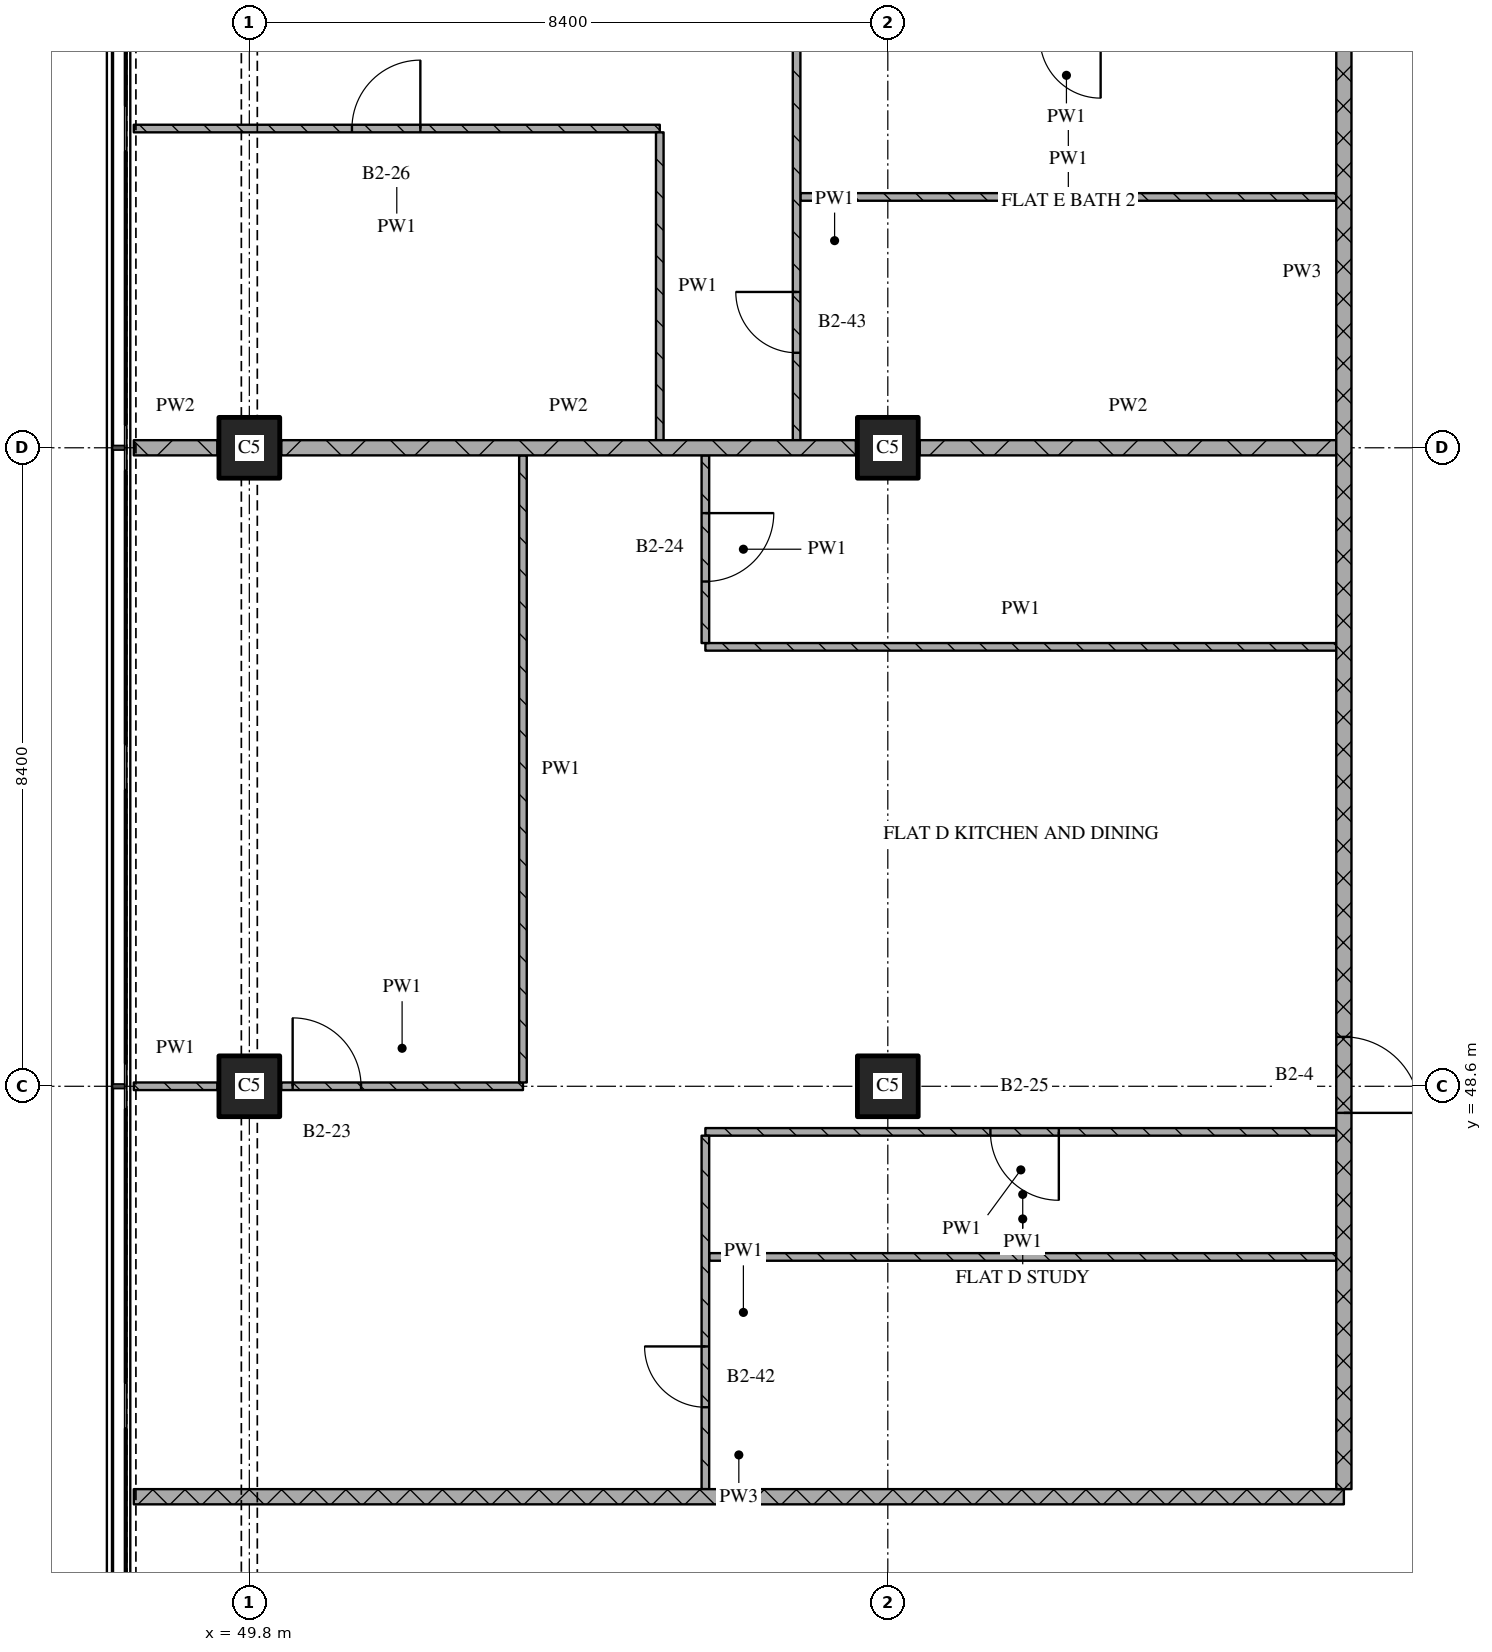
"""IFC4 building model, lengths in metres.
Left out: names, types, materials, properties, quantities, classifications, styles, units other than length and angle.
Written with IfcOpenShell. Run it as: python <this file> out.ifc"""

import sys

from ifc_helpers import new_model, si_unit, direction, frame, frame_2d, origin, origin_2d, place, context, subcontext, project, spatial, rectangle, extrude, element, fill, save


model = new_model("IFC4")
c1 = context("Model", 3, precision=1e-05, world=origin(), true_north=direction((0.0, 1.0)))
c2 = subcontext(c1, "Body", "Model", "MODEL_VIEW")
j1 = project(units=[si_unit("LENGTHUNIT", "METRE"), si_unit("PLANEANGLEUNIT", "RADIAN")], contexts=[c1])
p1 = place(None, origin())
s1 = spatial("IfcSite", under=j1, at=p1, CompositionType="ELEMENT")
p2 = place(p1, origin())
s2 = spatial("IfcBuilding", under=s1, at=p2, CompositionType="ELEMENT")
p3 = place(p2, frame((0.0, 0.0, 113.25)))
s3 = spatial("IfcBuildingStorey", under=s2, at=p3, CompositionType="ELEMENT", Elevation=113.25)
for number, where, z_axis, x_axis in (
    (1, (49.8, 48.6, 0.0), (0.0, 0.0, 1.0), (1.0, 0.0, 0.0)),
    (2, (49.8, 57.0, 0.0), (0.0, 0.0, 1.0), (1.0, 0.0, 0.0)),
    (3, (58.2, 48.6, 0.0), (0.0, 0.0, 1.0), (1.0, 0.0, 0.0)),
    (4, (58.2, 57.0, 0.0), (0.0, 0.0, 1.0), (1.0, 0.0, 0.0)),
):
    element("IfcColumn", number, at=place(p3, frame(where, z_axis=z_axis, x_axis=x_axis)), inside=s3, PredefinedType="COLUMN", context=c2, shape_type="SweptSolid", body=[
        extrude(rectangle(XDim=0.8, YDim=0.8, at=origin_2d()), origin(), (0.0, 0.0, 1.0), 3.6),
    ])
p4 = place(p3, frame((48.28, 43.2, 0.0), z_axis=(0.0, 0.0, 1.0), x_axis=(1.0, 0.0, 0.0)))
e5 = element("IfcWall", 5, at=p4, inside=s3, PredefinedType="PARTITIONING", context=c2, shape_type="SweptSolid", body=[
    extrude(rectangle(XDim=15.92, YDim=0.2, at=frame_2d((7.96, 0.0))), origin(), (0.0, 0.0, 1.0), 3.32),
])
p5 = place(p3, frame((55.85, 46.355, 0.0), z_axis=(0.0, 0.0, 1.0), x_axis=(1.0, 0.0, 0.0)))
e6 = element("IfcWall", 6, at=p5, inside=s3, PredefinedType="PARTITIONING", context=c2, shape_type="SweptSolid", body=[
    extrude(rectangle(XDim=8.25, YDim=0.1, at=frame_2d((4.125, 0.0))), origin(), (0.0, 0.0, 1.0), 3.32),
])
p6 = place(p3, frame((64.1, 48.0, 0.0), z_axis=(0.0, 0.0, 1.0), x_axis=(-1.0, 0.0, 0.0)))
e7 = element("IfcWall", 7, at=p6, inside=s3, PredefinedType="PARTITIONING", context=c2, shape_type="SweptSolid", body=[
    extrude(rectangle(XDim=8.3, YDim=0.1, at=frame_2d((4.15, 0.0))), origin(), (0.0, 0.0, 1.0), 3.32),
])
p7 = place(p6, frame((3.65, 0.0, 0.0)))
e8 = element("IfcOpeningElement", 8, at=p7, cuts=e7, PredefinedType="OPENING", context=c2, shape_type="SweptSolid", body=[
    extrude(rectangle(XDim=0.9, YDim=2.1, at=frame_2d((0.45, 1.05))), frame((0.0, 0.06, 0.0), z_axis=(0.0, -1.0, 0.0), x_axis=(1.0, 0.0, 0.0)), (0.0, 0.0, 1.0), 0.12),
])
p8 = place(p3, frame((48.28, 48.6, 0.0), z_axis=(0.0, 0.0, 1.0), x_axis=(1.0, 0.0, 0.0)))
e9 = element("IfcWall", 9, at=p8, inside=s3, PredefinedType="PARTITIONING", context=c2, shape_type="SweptSolid", body=[
    extrude(rectangle(XDim=1.1, YDim=0.1, at=frame_2d((0.55, 0.0))), origin(), (0.0, 0.0, 1.0), 3.32),
])
p9 = place(p3, frame((50.22, 48.6, 0.0), z_axis=(0.0, 0.0, 1.0), x_axis=(1.0, 0.0, 0.0)))
e10 = element("IfcWall", 10, at=p9, inside=s3, PredefinedType="PARTITIONING", context=c2, shape_type="SweptSolid", body=[
    extrude(rectangle(XDim=3.18, YDim=0.1, at=frame_2d((1.59, 0.0))), origin(), (0.0, 0.0, 1.0), 3.32),
])
p10 = place(p9, frame((0.15, 0.0, 0.0)))
e11 = element("IfcOpeningElement", 11, at=p10, cuts=e10, PredefinedType="OPENING", context=c2, shape_type="SweptSolid", body=[
    extrude(rectangle(XDim=0.9, YDim=2.1, at=frame_2d((0.45, 1.05))), frame((0.0, 0.06, 0.0), z_axis=(0.0, -1.0, 0.0), x_axis=(1.0, 0.0, 0.0)), (0.0, 0.0, 1.0), 0.12),
])
p11 = place(p3, frame((55.8, 54.381, 0.0), z_axis=(0.0, 0.0, 1.0), x_axis=(1.0, 0.0, 0.0)))
e12 = element("IfcWall", 12, at=p11, inside=s3, PredefinedType="PARTITIONING", context=c2, shape_type="SweptSolid", body=[
    extrude(rectangle(XDim=8.3, YDim=0.1, at=frame_2d((4.15, 0.0))), origin(), (0.0, 0.0, 1.0), 3.32),
])
p12 = place(p3, frame((48.28, 57.0, 0.0), z_axis=(0.0, 0.0, 1.0), x_axis=(1.0, 0.0, 0.0)))
e13 = element("IfcWall", 13, at=p12, inside=s3, PredefinedType="PARTITIONING", context=c2, shape_type="SweptSolid", body=[
    extrude(rectangle(XDim=1.1, YDim=0.2, at=frame_2d((0.55, 0.0))), origin(), (0.0, 0.0, 1.0), 3.32),
])
p13 = place(p3, frame((50.22, 57.0, 0.0), z_axis=(0.0, 0.0, 1.0), x_axis=(1.0, 0.0, 0.0)))
e14 = element("IfcWall", 14, at=p13, inside=s3, PredefinedType="PARTITIONING", context=c2, shape_type="SweptSolid", body=[
    extrude(rectangle(XDim=7.56, YDim=0.2, at=frame_2d((3.78, 0.0))), origin(), (0.0, 0.0, 1.0), 3.32),
])
p14 = place(p3, frame((58.62, 57.0, 0.0), z_axis=(0.0, 0.0, 1.0), x_axis=(1.0, 0.0, 0.0)))
e15 = element("IfcWall", 15, at=p14, inside=s3, PredefinedType="PARTITIONING", context=c2, shape_type="SweptSolid", body=[
    extrude(rectangle(XDim=5.48, YDim=0.2, at=frame_2d((2.74, 0.0))), origin(), (0.0, 0.0, 1.0), 3.32),
])
p15 = place(p3, frame((57.05, 60.3, 0.0), z_axis=(0.0, 0.0, 1.0), x_axis=(1.0, 0.0, 0.0)))
e16 = element("IfcWall", 16, at=p15, inside=s3, PredefinedType="PARTITIONING", context=c2, shape_type="SweptSolid", body=[
    extrude(rectangle(XDim=7.05, YDim=0.1, at=frame_2d((3.525, 0.0))), origin(), (0.0, 0.0, 1.0), 3.32),
])
p16 = place(p3, frame((55.2, 61.2, 0.0), z_axis=(0.0, 0.0, 1.0), x_axis=(-1.0, 0.0, 0.0)))
e17 = element("IfcWall", 17, at=p16, inside=s3, PredefinedType="PARTITIONING", context=c2, shape_type="SweptSolid", body=[
    extrude(rectangle(XDim=6.92, YDim=0.1, at=frame_2d((3.46, 0.0))), origin(), (0.0, 0.0, 1.0), 3.32),
])
p17 = place(p16, frame((3.15, 0.0, 0.0)))
e18 = element("IfcOpeningElement", 18, at=p17, cuts=e17, PredefinedType="OPENING", context=c2, shape_type="SweptSolid", body=[
    extrude(rectangle(XDim=0.9, YDim=2.1, at=frame_2d((0.45, 1.05))), frame((0.0, 0.06, 0.0), z_axis=(0.0, -1.0, 0.0), x_axis=(1.0, 0.0, 0.0)), (0.0, 0.0, 1.0), 0.12),
])
p18 = place(p3, frame((53.4, 56.9, 0.0), z_axis=(0.0, 0.0, 1.0), x_axis=(0.0, -1.0, 0.0)))
e19 = element("IfcWall", 19, at=p18, inside=s3, PredefinedType="PARTITIONING", context=c2, shape_type="SweptSolid", body=[
    extrude(rectangle(XDim=8.25, YDim=0.1, at=frame_2d((4.125, 0.0))), origin(), (0.0, 0.0, 1.0), 3.32),
])
p19 = place(p3, frame((55.2, 61.15, 0.0), z_axis=(0.0, 0.0, 1.0), x_axis=(0.0, -1.0, 0.0)))
e20 = element("IfcWall", 20, at=p19, inside=s3, PredefinedType="PARTITIONING", context=c2, shape_type="SweptSolid", body=[
    extrude(rectangle(XDim=4.05, YDim=0.1, at=frame_2d((2.025, 0.0))), origin(), (0.0, 0.0, 1.0), 3.32),
])
p20 = place(p3, frame((55.8, 47.95, 0.0), z_axis=(0.0, 0.0, 1.0), x_axis=(0.0, -1.0, 0.0)))
e21 = element("IfcWall", 21, at=p20, inside=s3, PredefinedType="PARTITIONING", context=c2, shape_type="SweptSolid", body=[
    extrude(rectangle(XDim=4.65, YDim=0.1, at=frame_2d((2.325, 0.0))), origin(), (0.0, 0.0, 1.0), 3.32),
])
p21 = place(p20, frame((2.773, 0.0, 0.0)))
e22 = element("IfcOpeningElement", 22, at=p21, cuts=e21, PredefinedType="OPENING", context=c2, shape_type="SweptSolid", body=[
    extrude(rectangle(XDim=0.8, YDim=2.1, at=frame_2d((0.4, 1.05))), frame((0.0, 0.06, 0.0), z_axis=(0.0, -1.0, 0.0), x_axis=(1.0, 0.0, 0.0)), (0.0, 0.0, 1.0), 0.12),
])
p22 = place(p3, frame((55.8, 56.9, 0.0), z_axis=(0.0, 0.0, 1.0), x_axis=(0.0, -1.0, 0.0)))
e23 = element("IfcWall", 23, at=p22, inside=s3, PredefinedType="PARTITIONING", context=c2, shape_type="SweptSolid", body=[
    extrude(rectangle(XDim=2.469, YDim=0.1, at=frame_2d((1.234, 0.0))), origin(), (0.0, 0.0, 1.0), 3.32),
])
p23 = place(p22, frame((0.76, 0.0, 0.0)))
e24 = element("IfcOpeningElement", 24, at=p23, cuts=e23, PredefinedType="OPENING", context=c2, shape_type="SweptSolid", body=[
    extrude(rectangle(XDim=0.9, YDim=2.1, at=frame_2d((0.45, 1.05))), frame((0.0, 0.06, 0.0), z_axis=(0.0, -1.0, 0.0), x_axis=(1.0, 0.0, 0.0)), (0.0, 0.0, 1.0), 0.12),
])
p24 = place(p3, frame((57.0, 62.35, 0.0), z_axis=(0.0, 0.0, 1.0), x_axis=(0.0, -1.0, 0.0)))
e25 = element("IfcWall", 25, at=p24, inside=s3, PredefinedType="PARTITIONING", context=c2, shape_type="SweptSolid", body=[
    extrude(rectangle(XDim=5.25, YDim=0.1, at=frame_2d((2.625, 0.0))), origin(), (0.0, 0.0, 1.0), 3.32),
])
p25 = place(p24, frame((3.3, 0.0, 0.0)))
e26 = element("IfcOpeningElement", 26, at=p25, cuts=e25, PredefinedType="OPENING", context=c2, shape_type="SweptSolid", body=[
    extrude(rectangle(XDim=0.8, YDim=2.1, at=frame_2d((0.4, 1.05))), frame((0.0, 0.06, 0.0), z_axis=(0.0, -1.0, 0.0), x_axis=(1.0, 0.0, 0.0)), (0.0, 0.0, 1.0), 0.12),
])
p26 = place(p3, frame((64.2, 43.3, 0.0), z_axis=(0.0, 0.0, 1.0), x_axis=(0.0, 1.0, 0.0)))
e27 = element("IfcWall", 27, at=p26, inside=s3, PredefinedType="PARTITIONING", context=c2, shape_type="SweptSolid", body=[
    extrude(rectangle(XDim=32.02, YDim=0.2, at=frame_2d((16.01, 0.0))), origin(), (0.0, 0.0, 1.0), 3.32),
])
p27 = place(p26, frame((4.95, 0.0, 0.0)))
e28 = element("IfcOpeningElement", 28, at=p27, cuts=e27, PredefinedType="OPENING", context=c2, shape_type="SweptSolid", body=[
    extrude(rectangle(XDim=1.0, YDim=2.1, at=frame_2d((0.5, 1.05))), frame((0.0, 0.11, 0.0), z_axis=(0.0, -1.0, 0.0), x_axis=(1.0, 0.0, 0.0)), (0.0, 0.0, 1.0), 0.22),
])
p28 = place(p26, frame((19.35, 0.0, 0.0)))
e29 = element("IfcOpeningElement", 29, at=p28, cuts=e27, PredefinedType="OPENING", context=c2, shape_type="SweptSolid", body=[
    extrude(rectangle(XDim=1.0, YDim=2.1, at=frame_2d((0.5, 1.05))), frame((0.0, 0.11, 0.0), z_axis=(0.0, -1.0, 0.0), x_axis=(1.0, 0.0, 0.0)), (0.0, 0.0, 1.0), 0.22),
])
p29 = place(p7, origin())
e30 = element("IfcDoor", 30, at=p29, inside=s3, OperationType="SINGLE_SWING_LEFT", PredefinedType="DOOR", context=c2, shape_type="SweptSolid", body=[
    extrude(rectangle(XDim=0.9, YDim=2.1, at=frame_2d((0.45, 1.05))), frame((0.0, 0.025, 0.0), z_axis=(0.0, -1.0, 0.0), x_axis=(1.0, 0.0, 0.0)), (0.0, 0.0, 1.0), 0.05),
])
fill(e8, e30)
p30 = place(p10, origin())
e31 = element("IfcDoor", 31, at=p30, inside=s3, OperationType="SINGLE_SWING_LEFT", PredefinedType="DOOR", context=c2, shape_type="SweptSolid", body=[
    extrude(rectangle(XDim=0.9, YDim=2.1, at=frame_2d((0.45, 1.05))), frame((0.0, 0.025, 0.0), z_axis=(0.0, -1.0, 0.0), x_axis=(1.0, 0.0, 0.0)), (0.0, 0.0, 1.0), 0.05),
])
fill(e11, e31)
p31 = place(p17, origin())
e32 = element("IfcDoor", 32, at=p31, inside=s3, OperationType="SINGLE_SWING_RIGHT", PredefinedType="DOOR", context=c2, shape_type="SweptSolid", body=[
    extrude(rectangle(XDim=0.9, YDim=2.1, at=frame_2d((0.45, 1.05))), frame((0.0, 0.025, 0.0), z_axis=(0.0, -1.0, 0.0), x_axis=(1.0, 0.0, 0.0)), (0.0, 0.0, 1.0), 0.05),
])
fill(e18, e32)
p32 = place(p21, origin())
e33 = element("IfcDoor", 33, at=p32, inside=s3, OperationType="SINGLE_SWING_RIGHT", PredefinedType="DOOR", context=c2, shape_type="SweptSolid", body=[
    extrude(rectangle(XDim=0.8, YDim=2.1, at=frame_2d((0.4, 1.05))), frame((0.0, 0.025, 0.0), z_axis=(0.0, -1.0, 0.0), x_axis=(1.0, 0.0, 0.0)), (0.0, 0.0, 1.0), 0.05),
])
fill(e22, e33)
p33 = place(p23, origin())
e34 = element("IfcDoor", 34, at=p33, inside=s3, OperationType="SINGLE_SWING_LEFT", PredefinedType="DOOR", context=c2, shape_type="SweptSolid", body=[
    extrude(rectangle(XDim=0.9, YDim=2.1, at=frame_2d((0.45, 1.05))), frame((0.0, 0.025, 0.0), z_axis=(0.0, -1.0, 0.0), x_axis=(1.0, 0.0, 0.0)), (0.0, 0.0, 1.0), 0.05),
])
fill(e24, e34)
p34 = place(p25, origin())
e35 = element("IfcDoor", 35, at=p34, inside=s3, OperationType="SINGLE_SWING_RIGHT", PredefinedType="DOOR", context=c2, shape_type="SweptSolid", body=[
    extrude(rectangle(XDim=0.8, YDim=2.1, at=frame_2d((0.4, 1.05))), frame((0.0, 0.025, 0.0), z_axis=(0.0, -1.0, 0.0), x_axis=(1.0, 0.0, 0.0)), (0.0, 0.0, 1.0), 0.05),
])
fill(e26, e35)
p35 = place(p27, origin())
e36 = element("IfcDoor", 36, at=p35, inside=s3, OperationType="SINGLE_SWING_RIGHT", PredefinedType="DOOR", context=c2, shape_type="SweptSolid", body=[
    extrude(rectangle(XDim=1.0, YDim=2.1, at=frame_2d((0.5, 1.05))), frame((0.0, 0.025, 0.0), z_axis=(0.0, -1.0, 0.0), x_axis=(1.0, 0.0, 0.0)), (0.0, 0.0, 1.0), 0.05),
])
fill(e28, e36)
save(model, sys.argv[1])
